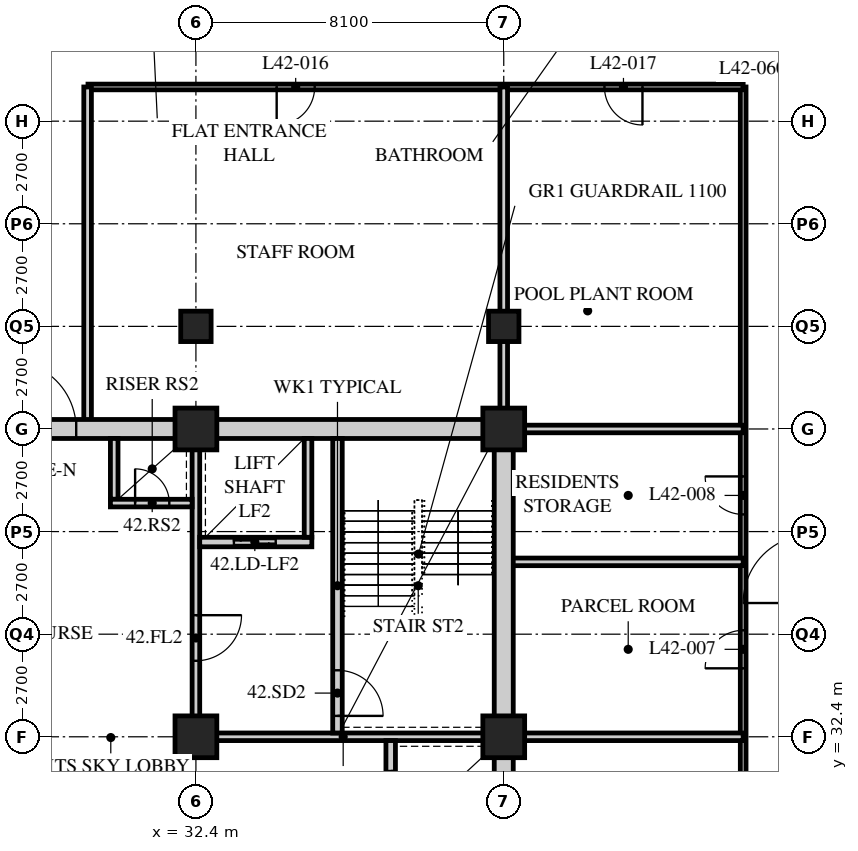
"""IFC4 building model, lengths in metres.
Left out: names, types, materials, properties, quantities, classifications, styles, units other than length and angle.
Written with IfcOpenShell. Run it as: python <this file> out.ifc"""

import sys

from ifc_helpers import new_model, si_unit, direction, frame, frame_2d, origin, origin_2d, place, context, subcontext, project, spatial, rectangle, hollow_rectangle, extrude, element, fill, save


model = new_model("IFC4")
c1 = context("Model", 3, precision=1e-05, world=origin(), true_north=direction((0.0, 1.0)))
c2 = subcontext(c1, "Body", "Model", "MODEL_VIEW")
j1 = project(units=[si_unit("LENGTHUNIT", "METRE"), si_unit("PLANEANGLEUNIT", "RADIAN")], contexts=[c1])
p1 = place(None, origin())
s1 = spatial("IfcSite", under=j1, at=p1, CompositionType="ELEMENT")
p2 = place(p1, origin())
s2 = spatial("IfcBuilding", under=s1, at=p2, CompositionType="ELEMENT")
p3 = place(p2, frame((0.0, 0.0, 165.0)))
s3 = spatial("IfcBuildingStorey", under=s2, at=p3, CompositionType="ELEMENT", Elevation=165.0)
for number, where, z_axis, x_axis in (
    (1, (32.4, 32.4, 0.0), (0.0, 0.0, 1.0), (1.0, 0.0, 0.0)),
    (2, (32.4, 40.5, 0.0), (0.0, 0.0, 1.0), (1.0, 0.0, 0.0)),
):
    element("IfcColumn", number, at=place(p3, frame(where, z_axis=z_axis, x_axis=x_axis)), inside=s3, PredefinedType="COLUMN", context=c2, shape_type="SweptSolid", body=[
        extrude(hollow_rectangle(XDim=1.1, YDim=1.1, WallThickness=0.1, at=origin_2d()), origin(), (0.0, 0.0, 1.0), 5.4),
    ])
p4 = place(p3, frame((32.4, 43.2, 0.0), z_axis=(0.0, 0.0, 1.0), x_axis=(1.0, 0.0, 0.0)))
e3 = element("IfcColumn", 3, at=p4, inside=s3, PredefinedType="COLUMN", context=c2, shape_type="SweptSolid", body=[
    extrude(hollow_rectangle(XDim=0.8, YDim=0.8, WallThickness=0.08, at=origin_2d()), origin(), (0.0, 0.0, 1.0), 5.4),
])
for number, where, z_axis, x_axis in (
    (4, (40.5, 32.4, 0.0), (0.0, 0.0, 1.0), (1.0, 0.0, 0.0)),
    (5, (40.5, 40.5, 0.0), (0.0, 0.0, 1.0), (1.0, 0.0, 0.0)),
):
    element("IfcColumn", number, at=place(p3, frame(where, z_axis=z_axis, x_axis=x_axis)), inside=s3, PredefinedType="COLUMN", context=c2, shape_type="SweptSolid", body=[
        extrude(hollow_rectangle(XDim=1.1, YDim=1.1, WallThickness=0.1, at=origin_2d()), origin(), (0.0, 0.0, 1.0), 5.4),
    ])
p5 = place(p3, frame((40.5, 43.2, 0.0), z_axis=(0.0, 0.0, 1.0), x_axis=(1.0, 0.0, 0.0)))
e6 = element("IfcColumn", 6, at=p5, inside=s3, PredefinedType="COLUMN", context=c2, shape_type="SweptSolid", body=[
    extrude(hollow_rectangle(XDim=0.8, YDim=0.8, WallThickness=0.08, at=origin_2d()), origin(), (0.0, 0.0, 1.0), 5.4),
])
p6 = place(p3, frame((46.8, 20.7, 0.0), z_axis=(0.0, 0.0, 1.0), x_axis=(0.0, 1.0, 0.0)))
e7 = element("IfcWall", 7, at=p6, inside=s3, PredefinedType="PARTITIONING", context=c2, shape_type="SweptSolid", body=[
    extrude(rectangle(XDim=28.8, YDim=0.15, at=frame_2d((14.4, 0.0))), origin(), (0.0, 0.0, 1.0), 5.19),
])
p7 = place(p6, frame((4.375, 0.0, 0.0)))
e8 = element("IfcOpeningElement", 8, at=p7, cuts=e7, PredefinedType="OPENING", context=c2, shape_type="SweptSolid", body=[
    extrude(rectangle(XDim=0.85, YDim=2.1, at=frame_2d((0.425, 1.05))), frame((0.0, 0.085, 0.0), z_axis=(0.0, -1.0, 0.0), x_axis=(1.0, 0.0, 0.0)), (0.0, 0.0, 1.0), 0.17),
])
p8 = place(p6, frame((8.35, 0.0, 0.0)))
e9 = element("IfcOpeningElement", 9, at=p8, cuts=e7, PredefinedType="OPENING", context=c2, shape_type="SweptSolid", body=[
    extrude(rectangle(XDim=1.0, YDim=2.1, at=frame_2d((0.5, 1.05))), frame((0.0, 0.085, 0.0), z_axis=(0.0, -1.0, 0.0), x_axis=(1.0, 0.0, 0.0)), (0.0, 0.0, 1.0), 0.17),
])
p9 = place(p6, frame((13.502, 0.0, 0.0)))
e10 = element("IfcOpeningElement", 10, at=p9, cuts=e7, PredefinedType="OPENING", context=c2, shape_type="SweptSolid", body=[
    extrude(rectangle(XDim=1.0, YDim=2.1, at=frame_2d((0.5, 1.05))), frame((0.0, 0.085, 0.0), z_axis=(0.0, -1.0, 0.0), x_axis=(1.0, 0.0, 0.0)), (0.0, 0.0, 1.0), 0.17),
])
p10 = place(p6, frame((17.552, 0.0, 0.0)))
e11 = element("IfcOpeningElement", 11, at=p10, cuts=e7, PredefinedType="OPENING", context=c2, shape_type="SweptSolid", body=[
    extrude(rectangle(XDim=1.0, YDim=2.1, at=frame_2d((0.5, 1.05))), frame((0.0, 0.085, 0.0), z_axis=(0.0, -1.0, 0.0), x_axis=(1.0, 0.0, 0.0)), (0.0, 0.0, 1.0), 0.17),
])
p11 = place(p3, frame((46.8, 49.5, 0.0), z_axis=(0.0, 0.0, 1.0), x_axis=(-1.0, 0.0, 0.0)))
e12 = element("IfcWall", 12, at=p11, inside=s3, PredefinedType="PARTITIONING", context=c2, shape_type="SweptSolid", body=[
    extrude(rectangle(XDim=17.24, YDim=0.15, at=frame_2d((8.62, 0.0))), origin(), (0.0, 0.0, 1.0), 5.19),
])
p12 = place(p11, frame((11.275, 0.0, 0.0)))
e13 = element("IfcOpeningElement", 13, at=p12, cuts=e12, PredefinedType="OPENING", context=c2, shape_type="SweptSolid", body=[
    extrude(rectangle(XDim=1.0, YDim=2.1, at=frame_2d((0.5, 1.05))), frame((0.0, 0.085, 0.0), z_axis=(0.0, -1.0, 0.0), x_axis=(1.0, 0.0, 0.0)), (0.0, 0.0, 1.0), 0.17),
])
p13 = place(p11, frame((2.65, 0.0, 0.0)))
e14 = element("IfcOpeningElement", 14, at=p13, cuts=e12, PredefinedType="OPENING", context=c2, shape_type="SweptSolid", body=[
    extrude(rectangle(XDim=1.0, YDim=2.1, at=frame_2d((0.5, 1.05))), frame((0.0, 0.085, 0.0), z_axis=(0.0, -1.0, 0.0), x_axis=(1.0, 0.0, 0.0)), (0.0, 0.0, 1.0), 0.17),
])
for number, where, z_axis, x_axis in (
    (15, (40.5, 32.4, 0.0), (0.0, 0.0, 1.0), (1.0, 0.0, 0.0)),
    (16, (46.8, 37.003, 0.0), (0.0, 0.0, 1.0), (-1.0, 0.0, 0.0)),
):
    element("IfcWall", number, at=place(p3, frame(where, z_axis=z_axis, x_axis=x_axis)), inside=s3, PredefinedType="SOLIDWALL", context=c2, shape_type="SweptSolid", body=[
        extrude(rectangle(XDim=6.3, YDim=0.2, at=frame_2d((3.15, 0.0))), origin(), (0.0, 0.0, 1.0), 5.19),
    ])
p14 = place(p3, frame((40.5, 40.5, 0.0), z_axis=(0.0, 0.0, 1.0), x_axis=(0.0, 1.0, 0.0)))
e17 = element("IfcWall", 17, at=p14, inside=s3, PredefinedType="SOLIDWALL", context=c2, shape_type="SweptSolid", body=[
    extrude(rectangle(XDim=9.0, YDim=0.2, at=frame_2d((4.5, 0.0))), origin(), (0.0, 0.0, 1.0), 4.42),
])
p15 = place(p3, frame((29.55, 40.5, 0.0), z_axis=(0.0, 0.0, 1.0), x_axis=(0.0, 1.0, 0.0)))
e18 = element("IfcWall", 18, at=p15, inside=s3, PredefinedType="SOLIDWALL", context=c2, shape_type="SweptSolid", body=[
    extrude(rectangle(XDim=9.0, YDim=0.2, at=frame_2d((4.5, 0.0))), origin(), (0.0, 0.0, 1.0), 5.19),
])
p16 = place(p3, frame((40.5, 40.5, 0.0), z_axis=(0.0, 0.0, 1.0), x_axis=(1.0, 0.0, 0.0)))
e19 = element("IfcWall", 19, at=p16, inside=s3, PredefinedType="SOLIDWALL", context=c2, shape_type="SweptSolid", body=[
    extrude(rectangle(XDim=6.3, YDim=0.2, at=frame_2d((3.15, 0.0))), origin(), (0.0, 0.0, 1.0), 5.19),
])
p17 = place(p3, frame((15.95, 40.5, 0.0), z_axis=(0.0, 0.0, 1.0), x_axis=(1.0, 0.0, 0.0)))
e20 = element("IfcWall", 20, at=p17, inside=s3, PredefinedType="SOLIDWALL", context=c2, shape_type="SweptSolid", body=[
    extrude(rectangle(XDim=24.8, YDim=0.5, at=frame_2d((12.4, 0.0))), origin(), (0.0, 0.0, 1.0), 4.42),
])
p18 = place(p17, frame((11.5, 0.0, 0.0)))
e21 = element("IfcOpeningElement", 21, at=p18, cuts=e20, PredefinedType="OPENING", context=c2, shape_type="SweptSolid", body=[
    extrude(rectangle(XDim=1.8, YDim=2.4, at=frame_2d((0.9, 1.2))), frame((0.0, 0.26, 0.0), z_axis=(0.0, -1.0, 0.0), x_axis=(1.0, 0.0, 0.0)), (0.0, 0.0, 1.0), 0.52),
])
p19 = place(p3, frame((40.5, 24.55, 0.0), z_axis=(0.0, 0.0, 1.0), x_axis=(0.0, 1.0, 0.0)))
e22 = element("IfcWall", 22, at=p19, inside=s3, PredefinedType="SOLIDWALL", context=c2, shape_type="SweptSolid", body=[
    extrude(rectangle(XDim=15.7, YDim=0.5, at=frame_2d((7.85, 0.0))), origin(), (0.0, 0.0, 1.0), 4.42),
])
p20 = place(p3, frame((32.3, 32.4, 0.0), z_axis=(0.0, 0.0, 1.0), x_axis=(1.0, 0.0, 0.0)))
e23 = element("IfcWall", 23, at=p20, inside=s3, PredefinedType="SOLIDWALL", context=c2, shape_type="SweptSolid", body=[
    extrude(rectangle(XDim=7.95, YDim=0.2, at=frame_2d((3.975, 0.0))), origin(), (0.0, 0.0, 1.0), 4.578),
])
p21 = place(p3, frame((32.4, 32.5, 0.0), z_axis=(0.0, 0.0, 1.0), x_axis=(0.0, 1.0, 0.0)))
e24 = element("IfcWall", 24, at=p21, inside=s3, PredefinedType="SOLIDWALL", context=c2, shape_type="SweptSolid", body=[
    extrude(rectangle(XDim=7.75, YDim=0.2, at=frame_2d((3.875, 0.0))), origin(), (0.0, 0.0, 1.0), 4.578),
])
p22 = place(p21, frame((1.9, 0.0, 0.0)))
e25 = element("IfcOpeningElement", 25, at=p22, cuts=e24, PredefinedType="OPENING", context=c2, shape_type="SweptSolid", body=[
    extrude(rectangle(XDim=1.2, YDim=2.1, at=frame_2d((0.6, 1.05))), frame((0.0, 0.11, 0.0), z_axis=(0.0, -1.0, 0.0), x_axis=(1.0, 0.0, 0.0)), (0.0, 0.0, 1.0), 0.22),
])
p23 = place(p3, frame((37.525, 24.55, 0.0), z_axis=(0.0, 0.0, 1.0), x_axis=(0.0, 1.0, 0.0)))
e26 = element("IfcWall", 26, at=p23, inside=s3, PredefinedType="SOLIDWALL", context=c2, shape_type="SweptSolid", body=[
    extrude(rectangle(XDim=7.75, YDim=0.25, at=frame_2d((3.875, 0.0))), origin(), (0.0, 0.0, 1.0), 5.19),
])
p24 = place(p23, frame((0.65, 0.0, 0.0)))
e27 = element("IfcOpeningElement", 27, at=p24, cuts=e26, PredefinedType="OPENING", context=c2, shape_type="SweptSolid", body=[
    extrude(rectangle(XDim=1.1, YDim=2.4, at=frame_2d((0.55, 1.2))), frame((0.0, 0.135, 0.0), z_axis=(0.0, -1.0, 0.0), x_axis=(1.0, 0.0, 0.0)), (0.0, 0.0, 1.0), 0.27),
])
p25 = place(p23, frame((3.25, 0.0, 0.0)))
e28 = element("IfcOpeningElement", 28, at=p25, cuts=e26, PredefinedType="OPENING", context=c2, shape_type="SweptSolid", body=[
    extrude(rectangle(XDim=1.1, YDim=2.4, at=frame_2d((0.55, 1.2))), frame((0.0, 0.135, 0.0), z_axis=(0.0, -1.0, 0.0), x_axis=(1.0, 0.0, 0.0)), (0.0, 0.0, 1.0), 0.27),
])
p26 = place(p23, frame((5.85, 0.0, 0.0)))
e29 = element("IfcOpeningElement", 29, at=p26, cuts=e26, PredefinedType="OPENING", context=c2, shape_type="SweptSolid", body=[
    extrude(rectangle(XDim=1.1, YDim=2.4, at=frame_2d((0.55, 1.2))), frame((0.0, 0.135, 0.0), z_axis=(0.0, -1.0, 0.0), x_axis=(1.0, 0.0, 0.0)), (0.0, 0.0, 1.0), 0.27),
])
p27 = place(p3, frame((36.125, 32.5, 0.0), z_axis=(0.0, 0.0, 1.0), x_axis=(0.0, 1.0, 0.0)))
e30 = element("IfcWall", 30, at=p27, inside=s3, PredefinedType="SOLIDWALL", context=c2, shape_type="SweptSolid", body=[
    extrude(rectangle(XDim=7.75, YDim=0.25, at=frame_2d((3.875, 0.0))), origin(), (0.0, 0.0, 1.0), 5.19),
])
p28 = place(p27, frame((0.45, 0.0, 0.0)))
e31 = element("IfcOpeningElement", 31, at=p28, cuts=e30, PredefinedType="OPENING", context=c2, shape_type="SweptSolid", body=[
    extrude(rectangle(XDim=1.2, YDim=2.1, at=frame_2d((0.6, 1.05))), frame((0.0, 0.135, 0.0), z_axis=(0.0, -1.0, 0.0), x_axis=(1.0, 0.0, 0.0)), (0.0, 0.0, 1.0), 0.27),
])
p29 = place(p3, frame((32.5, 37.525, 0.0), z_axis=(0.0, 0.0, 1.0), x_axis=(1.0, 0.0, 0.0)))
e32 = element("IfcWall", 32, at=p29, inside=s3, PredefinedType="SOLIDWALL", context=c2, shape_type="SweptSolid", body=[
    extrude(rectangle(XDim=2.95, YDim=0.25, at=frame_2d((1.475, 0.0))), origin(), (0.0, 0.0, 1.0), 5.19),
])
p30 = place(p29, frame((0.9, 0.0, 0.0)))
e33 = element("IfcOpeningElement", 33, at=p30, cuts=e32, PredefinedType="OPENING", context=c2, shape_type="SweptSolid", body=[
    extrude(rectangle(XDim=1.1, YDim=2.4, at=frame_2d((0.55, 1.2))), frame((0.0, 0.135, 0.0), z_axis=(0.0, -1.0, 0.0), x_axis=(1.0, 0.0, 0.0)), (0.0, 0.0, 1.0), 0.27),
])
p31 = place(p3, frame((35.35, 37.65, 0.0), z_axis=(0.0, 0.0, 1.0), x_axis=(0.0, 1.0, 0.0)))
e34 = element("IfcWall", 34, at=p31, inside=s3, PredefinedType="SOLIDWALL", context=c2, shape_type="SweptSolid", body=[
    extrude(rectangle(XDim=2.6, YDim=0.2, at=frame_2d((1.3, 0.0))), origin(), (0.0, 0.0, 1.0), 5.19),
])
p32 = place(p3, frame((30.25, 38.65, 0.0), z_axis=(0.0, 0.0, 1.0), x_axis=(0.0, 1.0, 0.0)))
e35 = element("IfcWall", 35, at=p32, inside=s3, PredefinedType="SOLIDWALL", context=c2, shape_type="SweptSolid", body=[
    extrude(rectangle(XDim=1.6, YDim=0.2, at=frame_2d((0.8, 0.0))), origin(), (0.0, 0.0, 1.0), 5.19),
])
p33 = place(p3, frame((30.15, 38.55, 0.0), z_axis=(0.0, 0.0, 1.0), x_axis=(1.0, 0.0, 0.0)))
e36 = element("IfcWall", 36, at=p33, inside=s3, PredefinedType="SOLIDWALL", context=c2, shape_type="SweptSolid", body=[
    extrude(rectangle(XDim=2.15, YDim=0.2, at=frame_2d((1.075, 0.0))), origin(), (0.0, 0.0, 1.0), 5.19),
])
p34 = place(p33, frame((0.65, 0.0, 0.0)))
e37 = element("IfcOpeningElement", 37, at=p34, cuts=e36, PredefinedType="OPENING", context=c2, shape_type="SweptSolid", body=[
    extrude(rectangle(XDim=0.9, YDim=2.1, at=frame_2d((0.45, 1.05))), frame((0.0, 0.11, 0.0), z_axis=(0.0, -1.0, 0.0), x_axis=(1.0, 0.0, 0.0)), (0.0, 0.0, 1.0), 0.22),
])
p35 = place(p9, origin())
e38 = element("IfcDoor", 38, at=p35, inside=s3, OperationType="SINGLE_SWING_LEFT", PredefinedType="DOOR", context=c2, shape_type="SweptSolid", body=[
    extrude(rectangle(XDim=1.0, YDim=2.1, at=frame_2d((0.5, 1.05))), frame((0.0, 0.025, 0.0), z_axis=(0.0, -1.0, 0.0), x_axis=(1.0, 0.0, 0.0)), (0.0, 0.0, 1.0), 0.05),
])
fill(e10, e38)
p36 = place(p10, origin())
e39 = element("IfcDoor", 39, at=p36, inside=s3, OperationType="SINGLE_SWING_RIGHT", PredefinedType="DOOR", context=c2, shape_type="SweptSolid", body=[
    extrude(rectangle(XDim=1.0, YDim=2.1, at=frame_2d((0.5, 1.05))), frame((0.0, 0.025, 0.0), z_axis=(0.0, -1.0, 0.0), x_axis=(1.0, 0.0, 0.0)), (0.0, 0.0, 1.0), 0.05),
])
fill(e11, e39)
p37 = place(p12, origin())
e40 = element("IfcDoor", 40, at=p37, inside=s3, OperationType="SINGLE_SWING_RIGHT", PredefinedType="DOOR", context=c2, shape_type="SweptSolid", body=[
    extrude(rectangle(XDim=1.0, YDim=2.1, at=frame_2d((0.5, 1.05))), frame((0.0, 0.025, 0.0), z_axis=(0.0, -1.0, 0.0), x_axis=(1.0, 0.0, 0.0)), (0.0, 0.0, 1.0), 0.05),
])
fill(e13, e40)
p38 = place(p13, origin())
e41 = element("IfcDoor", 41, at=p38, inside=s3, OperationType="SINGLE_SWING_LEFT", PredefinedType="DOOR", context=c2, shape_type="SweptSolid", body=[
    extrude(rectangle(XDim=1.0, YDim=2.1, at=frame_2d((0.5, 1.05))), frame((0.0, 0.025, 0.0), z_axis=(0.0, -1.0, 0.0), x_axis=(1.0, 0.0, 0.0)), (0.0, 0.0, 1.0), 0.05),
])
fill(e14, e41)
p39 = place(p28, origin())
e42 = element("IfcDoor", 42, at=p39, inside=s3, OperationType="SINGLE_SWING_RIGHT", PredefinedType="DOOR", context=c2, shape_type="SweptSolid", body=[
    extrude(rectangle(XDim=1.2, YDim=2.1, at=frame_2d((0.6, 1.05))), frame((0.0, 0.025, 0.0), z_axis=(0.0, -1.0, 0.0), x_axis=(1.0, 0.0, 0.0)), (0.0, 0.0, 1.0), 0.05),
])
fill(e31, e42)
p40 = place(p22, origin())
e43 = element("IfcDoor", 43, at=p40, inside=s3, OperationType="SINGLE_SWING_LEFT", PredefinedType="DOOR", context=c2, shape_type="SweptSolid", body=[
    extrude(rectangle(XDim=1.2, YDim=2.1, at=frame_2d((0.6, 1.05))), frame((0.0, 0.025, 0.0), z_axis=(0.0, -1.0, 0.0), x_axis=(1.0, 0.0, 0.0)), (0.0, 0.0, 1.0), 0.05),
])
fill(e25, e43)
p41 = place(p34, origin())
e44 = element("IfcDoor", 44, at=p41, inside=s3, OperationType="SINGLE_SWING_LEFT", PredefinedType="DOOR", context=c2, shape_type="SweptSolid", body=[
    extrude(rectangle(XDim=0.9, YDim=2.1, at=frame_2d((0.45, 1.05))), frame((0.0, 0.025, 0.0), z_axis=(0.0, -1.0, 0.0), x_axis=(1.0, 0.0, 0.0)), (0.0, 0.0, 1.0), 0.05),
])
fill(e37, e44)
p42 = place(p26, origin())
e45 = element("IfcDoor", 45, at=p42, inside=s3, OperationType="DOUBLE_DOOR_SLIDING", PredefinedType="DOOR", context=c2, shape_type="SweptSolid", body=[
    extrude(rectangle(XDim=1.1, YDim=2.4, at=frame_2d((0.55, 1.2))), frame((0.0, 0.025, 0.0), z_axis=(0.0, -1.0, 0.0), x_axis=(1.0, 0.0, 0.0)), (0.0, 0.0, 1.0), 0.05),
])
fill(e29, e45)
p43 = place(p30, origin())
e46 = element("IfcDoor", 46, at=p43, inside=s3, OperationType="DOUBLE_DOOR_SLIDING", PredefinedType="DOOR", context=c2, shape_type="SweptSolid", body=[
    extrude(rectangle(XDim=1.1, YDim=2.4, at=frame_2d((0.55, 1.2))), frame((0.0, 0.025, 0.0), z_axis=(0.0, -1.0, 0.0), x_axis=(1.0, 0.0, 0.0)), (0.0, 0.0, 1.0), 0.05),
])
fill(e33, e46)
p44 = place(p18, origin())
e47 = element("IfcDoor", 47, at=p44, inside=s3, OperationType="DOUBLE_DOOR_SINGLE_SWING", PredefinedType="DOOR", context=c2, shape_type="SweptSolid", body=[
    extrude(rectangle(XDim=1.8, YDim=2.4, at=frame_2d((0.9, 1.2))), frame((0.0, 0.025, 0.0), z_axis=(0.0, -1.0, 0.0), x_axis=(1.0, 0.0, 0.0)), (0.0, 0.0, 1.0), 0.05),
])
fill(e21, e47)
save(model, sys.argv[1])
